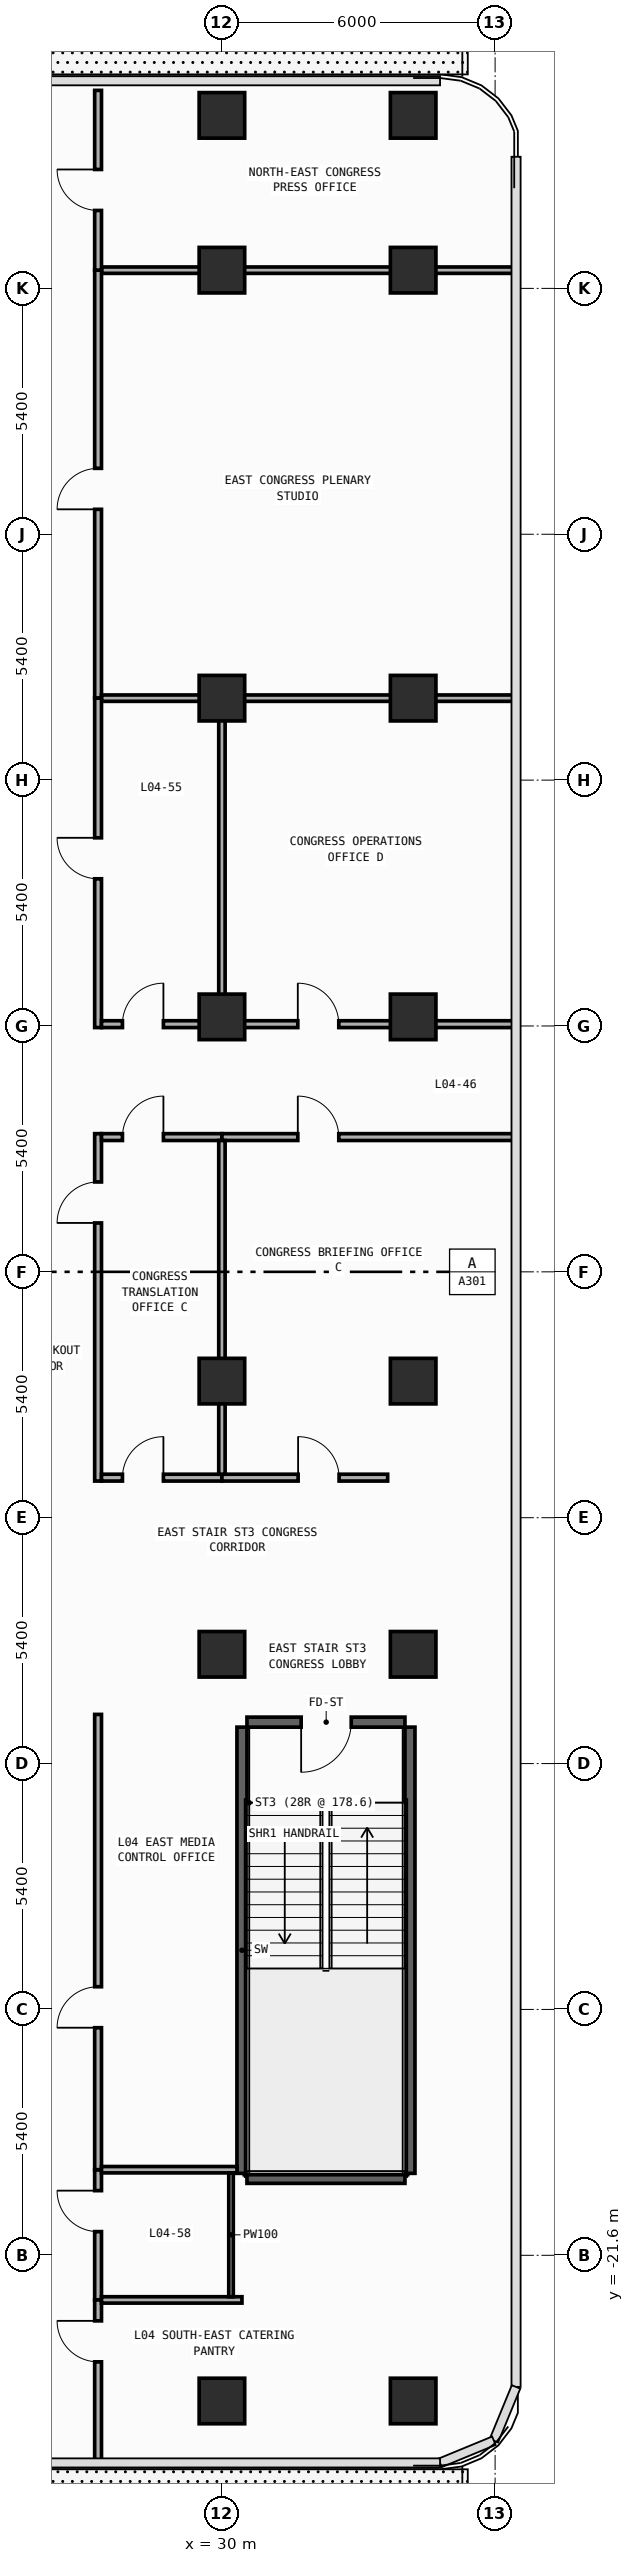
"""IFC4 building model, lengths in metres.
Left out: names, types, materials, properties, quantities, classifications, styles, units other than length and angle.
Written with IfcOpenShell. Run it as: python <this file> out.ifc"""

import sys

from ifc_helpers import new_model, si_unit, direction, frame, frame_2d, origin, origin_2d, place, context, subcontext, project, spatial, rectangle, extrude, element, fill, save


model = new_model("IFC4")
c1 = context("Model", 3, precision=1e-05, world=origin(), true_north=direction((0.0, 1.0)))
c2 = subcontext(c1, "Body", "Model", "MODEL_VIEW")
j1 = project(units=[si_unit("LENGTHUNIT", "METRE"), si_unit("PLANEANGLEUNIT", "RADIAN")], contexts=[c1])
p1 = place(None, origin())
s1 = spatial("IfcSite", under=j1, at=p1, CompositionType="ELEMENT")
p2 = place(p1, origin())
s2 = spatial("IfcBuilding", under=s1, at=p2, CompositionType="ELEMENT")
p3 = place(p2, frame((0.0, 0.0, 16.0)))
s3 = spatial("IfcBuildingStorey", under=s2, at=p3, CompositionType="ELEMENT", Elevation=16.0)
p4 = place(p3, frame((34.02, -9.89, 0.0), z_axis=(0.0, 0.0, 1.0), x_axis=(-1.0, 0.0, 0.0)))
e1 = element("IfcWall", 1, at=p4, inside=s3, PredefinedType="SHEAR", context=c2, shape_type="SweptSolid", body=[
    extrude(rectangle(XDim=3.47, YDim=0.22, at=frame_2d((1.735, 0.0))), origin(), (0.0, 0.0, 1.0), 4.55),
])
p5 = place(p4, frame((1.18, 0.0, 0.0)))
e2 = element("IfcOpeningElement", 2, at=p5, cuts=e1, PredefinedType="OPENING", context=c2, shape_type="SweptSolid", body=[
    extrude(rectangle(XDim=1.1, YDim=2.2, at=frame_2d((0.55, 1.1))), frame((0.0, 0.12, 0.0), z_axis=(0.0, -1.0, 0.0), x_axis=(1.0, 0.0, 0.0)), (0.0, 0.0, 1.0), 0.24),
])
p6 = place(p3, frame((30.55, -19.91, 0.0), z_axis=(0.0, 0.0, 1.0), x_axis=(1.0, 0.0, 0.0)))
e3 = element("IfcWall", 3, at=p6, inside=s3, PredefinedType="SHEAR", context=c2, shape_type="SweptSolid", body=[
    extrude(rectangle(XDim=3.47, YDim=0.22, at=frame_2d((1.735, 0.0))), origin(), (0.0, 0.0, 1.0), 4.55),
])
for number, where, z_axis, x_axis in (
    (4, (30.44, -19.8, 0.0), (0.0, 0.0, 1.0), (0.0, 1.0, 0.0)),
    (5, (34.13, -19.8, 0.0), (0.0, 0.0, 1.0), (0.0, 1.0, 0.0)),
):
    element("IfcWall", number, at=place(p3, frame(where, z_axis=z_axis, x_axis=x_axis)), inside=s3, PredefinedType="SHEAR", context=c2, shape_type="SweptSolid", body=[
        extrude(rectangle(XDim=9.8, YDim=0.22, at=frame_2d((4.9, 0.0))), origin(), (0.0, 0.0, 1.0), 4.55),
    ])
for number, where, z_axis, x_axis in (
    (6, (30.0, -24.8, 0.0), (0.0, 0.0, 1.0), (1.0, 0.0, 0.0)),
    (7, (30.0, -8.4, 0.0), (0.0, 0.0, 1.0), (1.0, 0.0, 0.0)),
    (8, (30.0, -2.4, 0.0), (0.0, 0.0, 1.0), (1.0, 0.0, 0.0)),
    (9, (30.0, 5.6, 0.0), (0.0, 0.0, 1.0), (1.0, 0.0, 0.0)),
    (10, (30.0, 12.6, 0.0), (0.0, 0.0, 1.0), (1.0, 0.0, 0.0)),
    (11, (30.0, 22.0, 0.0), (0.0, 0.0, 1.0), (1.0, 0.0, 0.0)),
    (12, (30.0, 25.4, 0.0), (0.0, 0.0, 1.0), (1.0, 0.0, 0.0)),
    (13, (34.2, -24.8, 0.0), (0.0, 0.0, 1.0), (1.0, 0.0, 0.0)),
    (14, (34.2, -8.4, 0.0), (0.0, 0.0, 1.0), (1.0, 0.0, 0.0)),
    (15, (34.2, -2.4, 0.0), (0.0, 0.0, 1.0), (1.0, 0.0, 0.0)),
    (16, (34.2, 5.6, 0.0), (0.0, 0.0, 1.0), (1.0, 0.0, 0.0)),
    (17, (34.2, 12.6, 0.0), (0.0, 0.0, 1.0), (1.0, 0.0, 0.0)),
    (18, (34.2, 22.0, 0.0), (0.0, 0.0, 1.0), (1.0, 0.0, 0.0)),
    (19, (34.2, 25.4, 0.0), (0.0, 0.0, 1.0), (1.0, 0.0, 0.0)),
):
    element("IfcColumn", number, at=place(p3, frame(where, z_axis=z_axis, x_axis=x_axis)), inside=s3, PredefinedType="COLUMN", context=c2, shape_type="SweptSolid", body=[
        extrude(rectangle(XDim=1.0, YDim=1.0, at=origin_2d()), origin(), (0.0, 0.0, 1.0), 5.0),
    ])
p7 = place(p3, frame((27.355, 22.0, 0.0), z_axis=(0.0, 0.0, 1.0), x_axis=(1.0, 0.0, 0.0)))
e20 = element("IfcWall", 20, at=p7, inside=s3, PredefinedType="PARTITIONING", context=c2, shape_type="SweptSolid", body=[
    extrude(rectangle(XDim=9.09, YDim=0.14, at=frame_2d((4.545, 0.0))), origin(), (0.0, 0.0, 1.0), 3.65),
])
p8 = place(p3, frame((27.28, 12.6, 0.0), z_axis=(0.0, 0.0, 1.0), x_axis=(0.0, 1.0, 0.0)))
e21 = element("IfcWall", 21, at=p8, inside=s3, PredefinedType="PARTITIONING", context=c2, shape_type="SweptSolid", body=[
    extrude(rectangle(XDim=9.4, YDim=0.15, at=frame_2d((4.7, 0.0))), origin(), (0.0, 0.0, 1.0), 4.55),
])
p9 = place(p8, frame((4.148, 0.0, 0.0)))
e22 = element("IfcOpeningElement", 22, at=p9, cuts=e21, PredefinedType="OPENING", context=c2, shape_type="SweptSolid", body=[
    extrude(rectangle(XDim=0.9, YDim=2.15, at=frame_2d((0.45, 1.075))), frame((0.0, 0.085, 0.0), z_axis=(0.0, -1.0, 0.0), x_axis=(1.0, 0.0, 0.0)), (0.0, 0.0, 1.0), 0.17),
])
p10 = place(p3, frame((27.355, 12.6, 0.0), z_axis=(0.0, 0.0, 1.0), x_axis=(1.0, 0.0, 0.0)))
e23 = element("IfcWall", 23, at=p10, inside=s3, PredefinedType="PARTITIONING", context=c2, shape_type="SweptSolid", body=[
    extrude(rectangle(XDim=2.645, YDim=0.14, at=frame_2d((1.323, 0.0))), origin(), (0.0, 0.0, 1.0), 3.65),
])
p11 = place(p3, frame((30.0, 12.6, 0.0), z_axis=(0.0, 0.0, 1.0), x_axis=(1.0, 0.0, 0.0)))
e24 = element("IfcWall", 24, at=p11, inside=s3, PredefinedType="PARTITIONING", context=c2, shape_type="SweptSolid", body=[
    extrude(rectangle(XDim=6.445, YDim=0.14, at=frame_2d((3.223, 0.0))), origin(), (0.0, 0.0, 1.0), 3.65),
])
p12 = place(p3, frame((27.28, 22.0, 0.0), z_axis=(0.0, 0.0, 1.0), x_axis=(0.0, 1.0, 0.0)))
e25 = element("IfcWall", 25, at=p12, inside=s3, PredefinedType="PARTITIONING", context=c2, shape_type="SweptSolid", body=[
    extrude(rectangle(XDim=3.949, YDim=0.15, at=frame_2d((1.975, 0.0))), origin(), (0.0, 0.0, 1.0), 4.55),
])
p13 = place(p12, frame((1.312, 0.0, 0.0)))
e26 = element("IfcOpeningElement", 26, at=p13, cuts=e25, PredefinedType="OPENING", context=c2, shape_type="SweptSolid", body=[
    extrude(rectangle(XDim=0.9, YDim=2.15, at=frame_2d((0.45, 1.075))), frame((0.0, 0.085, 0.0), z_axis=(0.0, -1.0, 0.0), x_axis=(1.0, 0.0, 0.0)), (0.0, 0.0, 1.0), 0.17),
])
p14 = place(p3, frame((27.28, -4.595, 0.0), z_axis=(0.0, 0.0, 1.0), x_axis=(0.0, 1.0, 0.0)))
e27 = element("IfcWall", 27, at=p14, inside=s3, PredefinedType="PARTITIONING", context=c2, shape_type="SweptSolid", body=[
    extrude(rectangle(XDim=7.63, YDim=0.15, at=frame_2d((3.815, 0.0))), origin(), (0.0, 0.0, 1.0), 4.55),
])
p15 = place(p14, frame((5.669, 0.0, 0.0)))
e28 = element("IfcOpeningElement", 28, at=p15, cuts=e27, PredefinedType="OPENING", context=c2, shape_type="SweptSolid", body=[
    extrude(rectangle(XDim=0.9, YDim=2.15, at=frame_2d((0.45, 1.075))), frame((0.0, 0.085, 0.0), z_axis=(0.0, -1.0, 0.0), x_axis=(1.0, 0.0, 0.0)), (0.0, 0.0, 1.0), 0.17),
])
p16 = place(p3, frame((27.28, 5.365, 0.0), z_axis=(0.0, 0.0, 1.0), x_axis=(0.0, 1.0, 0.0)))
e29 = element("IfcWall", 29, at=p16, inside=s3, PredefinedType="PARTITIONING", context=c2, shape_type="SweptSolid", body=[
    extrude(rectangle(XDim=7.235, YDim=0.15, at=frame_2d((3.618, 0.0))), origin(), (0.0, 0.0, 1.0), 4.55),
])
p17 = place(p16, frame((3.268, 0.0, 0.0)))
e30 = element("IfcOpeningElement", 30, at=p17, cuts=e29, PredefinedType="OPENING", context=c2, shape_type="SweptSolid", body=[
    extrude(rectangle(XDim=0.9, YDim=2.15, at=frame_2d((0.45, 1.075))), frame((0.0, 0.085, 0.0), z_axis=(0.0, -1.0, 0.0), x_axis=(1.0, 0.0, 0.0)), (0.0, 0.0, 1.0), 0.17),
])
p18 = place(p3, frame((27.28, -22.58, 0.0), z_axis=(0.0, 0.0, 1.0), x_axis=(0.0, 1.0, 0.0)))
e31 = element("IfcWall", 31, at=p18, inside=s3, PredefinedType="PARTITIONING", context=c2, shape_type="SweptSolid", body=[
    extrude(rectangle(XDim=2.86, YDim=0.15, at=frame_2d((1.43, 0.0))), origin(), (0.0, 0.0, 1.0), 4.55),
])
p19 = place(p18, frame((1.5, 0.0, 0.0)))
e32 = element("IfcOpeningElement", 32, at=p19, cuts=e31, PredefinedType="OPENING", context=c2, shape_type="SweptSolid", body=[
    extrude(rectangle(XDim=0.9, YDim=2.15, at=frame_2d((0.45, 1.075))), frame((0.0, 0.085, 0.0), z_axis=(0.0, -1.0, 0.0), x_axis=(1.0, 0.0, 0.0)), (0.0, 0.0, 1.0), 0.17),
])
p20 = place(p3, frame((27.28, -26.121, 0.0), z_axis=(0.0, 0.0, 1.0), x_axis=(0.0, 1.0, 0.0)))
e33 = element("IfcWall", 33, at=p20, inside=s3, PredefinedType="PARTITIONING", context=c2, shape_type="SweptSolid", body=[
    extrude(rectangle(XDim=3.541, YDim=0.15, at=frame_2d((1.771, 0.0))), origin(), (0.0, 0.0, 1.0), 4.55),
])
p21 = place(p20, frame((2.181, 0.0, 0.0)))
e34 = element("IfcOpeningElement", 34, at=p21, cuts=e33, PredefinedType="OPENING", context=c2, shape_type="SweptSolid", body=[
    extrude(rectangle(XDim=0.9, YDim=2.15, at=frame_2d((0.45, 1.075))), frame((0.0, 0.085, 0.0), z_axis=(0.0, -1.0, 0.0), x_axis=(1.0, 0.0, 0.0)), (0.0, 0.0, 1.0), 0.17),
])
p22 = place(p3, frame((27.28, -19.72, 0.0), z_axis=(0.0, 0.0, 1.0), x_axis=(0.0, 1.0, 0.0)))
e35 = element("IfcWall", 35, at=p22, inside=s3, PredefinedType="PARTITIONING", context=c2, shape_type="SweptSolid", body=[
    extrude(rectangle(XDim=10.0, YDim=0.15, at=frame_2d((5.0, 0.0))), origin(), (0.0, 0.0, 1.0), 4.55),
])
p23 = place(p22, frame((3.118, 0.0, 0.0)))
e36 = element("IfcOpeningElement", 36, at=p23, cuts=e35, PredefinedType="OPENING", context=c2, shape_type="SweptSolid", body=[
    extrude(rectangle(XDim=0.9, YDim=2.15, at=frame_2d((0.45, 1.075))), frame((0.0, 0.085, 0.0), z_axis=(0.0, -1.0, 0.0), x_axis=(1.0, 0.0, 0.0)), (0.0, 0.0, 1.0), 0.17),
])
p24 = place(p3, frame((27.355, 2.96, 0.0), z_axis=(0.0, 0.0, 1.0), x_axis=(1.0, 0.0, 0.0)))
e37 = element("IfcWall", 37, at=p24, inside=s3, PredefinedType="PARTITIONING", context=c2, shape_type="SweptSolid", body=[
    extrude(rectangle(XDim=2.645, YDim=0.15, at=frame_2d((1.323, 0.0))), origin(), (0.0, 0.0, 1.0), 4.55),
])
p25 = place(p24, frame((0.46, 0.0, 0.0)))
e38 = element("IfcOpeningElement", 38, at=p25, cuts=e37, PredefinedType="OPENING", context=c2, shape_type="SweptSolid", body=[
    extrude(rectangle(XDim=0.9, YDim=2.15, at=frame_2d((0.45, 1.075))), frame((0.0, 0.085, 0.0), z_axis=(0.0, -1.0, 0.0), x_axis=(1.0, 0.0, 0.0)), (0.0, 0.0, 1.0), 0.17),
])
p26 = place(p3, frame((30.0, 2.96, 0.0), z_axis=(0.0, 0.0, 1.0), x_axis=(1.0, 0.0, 0.0)))
e39 = element("IfcWall", 39, at=p26, inside=s3, PredefinedType="PARTITIONING", context=c2, shape_type="SweptSolid", body=[
    extrude(rectangle(XDim=6.445, YDim=0.15, at=frame_2d((3.223, 0.0))), origin(), (0.0, 0.0, 1.0), 4.55),
])
p27 = place(p26, frame((1.667, 0.0, 0.0)))
e40 = element("IfcOpeningElement", 40, at=p27, cuts=e39, PredefinedType="OPENING", context=c2, shape_type="SweptSolid", body=[
    extrude(rectangle(XDim=0.9, YDim=2.15, at=frame_2d((0.45, 1.075))), frame((0.0, 0.085, 0.0), z_axis=(0.0, -1.0, 0.0), x_axis=(1.0, 0.0, 0.0)), (0.0, 0.0, 1.0), 0.17),
])
p28 = place(p3, frame((27.355, 5.44, 0.0), z_axis=(0.0, 0.0, 1.0), x_axis=(1.0, 0.0, 0.0)))
e41 = element("IfcWall", 41, at=p28, inside=s3, PredefinedType="PARTITIONING", context=c2, shape_type="SweptSolid", body=[
    extrude(rectangle(XDim=2.645, YDim=0.15, at=frame_2d((1.323, 0.0))), origin(), (0.0, 0.0, 1.0), 3.65),
])
p29 = place(p28, frame((0.46, 0.0, 0.0)))
e42 = element("IfcOpeningElement", 42, at=p29, cuts=e41, PredefinedType="OPENING", context=c2, shape_type="SweptSolid", body=[
    extrude(rectangle(XDim=0.9, YDim=2.15, at=frame_2d((0.45, 1.075))), frame((0.0, 0.085, 0.0), z_axis=(0.0, -1.0, 0.0), x_axis=(1.0, 0.0, 0.0)), (0.0, 0.0, 1.0), 0.17),
])
p30 = place(p3, frame((30.0, 5.44, 0.0), z_axis=(0.0, 0.0, 1.0), x_axis=(1.0, 0.0, 0.0)))
e43 = element("IfcWall", 43, at=p30, inside=s3, PredefinedType="PARTITIONING", context=c2, shape_type="SweptSolid", body=[
    extrude(rectangle(XDim=6.445, YDim=0.15, at=frame_2d((3.223, 0.0))), origin(), (0.0, 0.0, 1.0), 3.65),
])
p31 = place(p30, frame((1.667, 0.0, 0.0)))
e44 = element("IfcOpeningElement", 44, at=p31, cuts=e43, PredefinedType="OPENING", context=c2, shape_type="SweptSolid", body=[
    extrude(rectangle(XDim=0.9, YDim=2.15, at=frame_2d((0.45, 1.075))), frame((0.0, 0.085, 0.0), z_axis=(0.0, -1.0, 0.0), x_axis=(1.0, 0.0, 0.0)), (0.0, 0.0, 1.0), 0.17),
])
p32 = place(p3, frame((27.355, -4.52, 0.0), z_axis=(0.0, 0.0, 1.0), x_axis=(1.0, 0.0, 0.0)))
e45 = element("IfcWall", 45, at=p32, inside=s3, PredefinedType="PARTITIONING", context=c2, shape_type="SweptSolid", body=[
    extrude(rectangle(XDim=2.645, YDim=0.15, at=frame_2d((1.323, 0.0))), origin(), (0.0, 0.0, 1.0), 4.55),
])
p33 = place(p32, frame((0.46, 0.0, 0.0)))
e46 = element("IfcOpeningElement", 46, at=p33, cuts=e45, PredefinedType="OPENING", context=c2, shape_type="SweptSolid", body=[
    extrude(rectangle(XDim=0.9, YDim=2.15, at=frame_2d((0.45, 1.075))), frame((0.0, 0.085, 0.0), z_axis=(0.0, -1.0, 0.0), x_axis=(1.0, 0.0, 0.0)), (0.0, 0.0, 1.0), 0.17),
])
p34 = place(p3, frame((30.0, -4.52, 0.0), z_axis=(0.0, 0.0, 1.0), x_axis=(1.0, 0.0, 0.0)))
e47 = element("IfcWall", 47, at=p34, inside=s3, PredefinedType="PARTITIONING", context=c2, shape_type="SweptSolid", body=[
    extrude(rectangle(XDim=3.64, YDim=0.15, at=frame_2d((1.82, 0.0))), origin(), (0.0, 0.0, 1.0), 4.55),
])
p35 = place(p34, frame((1.673, 0.0, 0.0)))
e48 = element("IfcOpeningElement", 48, at=p35, cuts=e47, PredefinedType="OPENING", context=c2, shape_type="SweptSolid", body=[
    extrude(rectangle(XDim=0.9, YDim=2.15, at=frame_2d((0.45, 1.075))), frame((0.0, 0.085, 0.0), z_axis=(0.0, -1.0, 0.0), x_axis=(1.0, 0.0, 0.0)), (0.0, 0.0, 1.0), 0.17),
])
p36 = place(p3, frame((30.0, -4.445, 0.0), z_axis=(0.0, 0.0, 1.0), x_axis=(0.0, 1.0, 0.0)))
e49 = element("IfcWall", 49, at=p36, inside=s3, PredefinedType="PARTITIONING", context=c2, shape_type="SweptSolid", body=[
    extrude(rectangle(XDim=7.33, YDim=0.14, at=frame_2d((3.665, 0.0))), origin(), (0.0, 0.0, 1.0), 3.65),
])
p37 = place(p3, frame((30.0, 5.515, 0.0), z_axis=(0.0, 0.0, 1.0), x_axis=(0.0, 1.0, 0.0)))
e50 = element("IfcWall", 50, at=p37, inside=s3, PredefinedType="PARTITIONING", context=c2, shape_type="SweptSolid", body=[
    extrude(rectangle(XDim=7.015, YDim=0.14, at=frame_2d((3.508, 0.0))), origin(), (0.0, 0.0, 1.0), 3.65),
])
p38 = place(p3, frame((27.355, -22.58, 0.0), z_axis=(0.0, 0.0, 1.0), x_axis=(1.0, 0.0, 0.0)))
e51 = element("IfcWall", 51, at=p38, inside=s3, PredefinedType="PARTITIONING", context=c2, shape_type="SweptSolid", body=[
    extrude(rectangle(XDim=3.085, YDim=0.14, at=frame_2d((1.542, 0.0))), origin(), (0.0, 0.0, 1.0), 4.55),
])
p39 = place(p3, frame((27.355, -19.72, 0.0), z_axis=(0.0, 0.0, 1.0), x_axis=(1.0, 0.0, 0.0)))
e52 = element("IfcWall", 52, at=p39, inside=s3, PredefinedType="PARTITIONING", context=c2, shape_type="SweptSolid", body=[
    extrude(rectangle(XDim=2.975, YDim=0.14, at=frame_2d((1.488, 0.0))), origin(), (0.0, 0.0, 1.0), 4.55),
])
p40 = place(p3, frame((30.2, -19.79, 0.0), z_axis=(0.0, 0.0, 1.0), x_axis=(0.0, -1.0, 0.0)))
e53 = element("IfcWall", 53, at=p40, inside=s3, PredefinedType="PARTITIONING", context=c2, shape_type="SweptSolid", body=[
    extrude(rectangle(XDim=2.72, YDim=0.1, at=frame_2d((1.36, 0.0))), origin(), (0.0, 0.0, 1.0), 4.55),
])
p41 = place(p5, origin())
e54 = element("IfcDoor", 54, at=p41, inside=s3, OperationType="SINGLE_SWING_RIGHT", PredefinedType="DOOR", context=c2, shape_type="SweptSolid", body=[
    extrude(rectangle(XDim=1.1, YDim=2.2, at=frame_2d((0.55, 1.1))), frame((0.0, 0.025, 0.0), z_axis=(0.0, -1.0, 0.0), x_axis=(1.0, 0.0, 0.0)), (0.0, 0.0, 1.0), 0.05),
])
fill(e2, e54)
p42 = place(p9, origin())
e55 = element("IfcDoor", 55, at=p42, inside=s3, OperationType="SINGLE_SWING_LEFT", PredefinedType="DOOR", context=c2, shape_type="SweptSolid", body=[
    extrude(rectangle(XDim=0.9, YDim=2.15, at=frame_2d((0.45, 1.075))), frame((0.0, 0.025, 0.0), z_axis=(0.0, -1.0, 0.0), x_axis=(1.0, 0.0, 0.0)), (0.0, 0.0, 1.0), 0.05),
])
fill(e22, e55)
p43 = place(p13, origin())
e56 = element("IfcDoor", 56, at=p43, inside=s3, OperationType="SINGLE_SWING_RIGHT", PredefinedType="DOOR", context=c2, shape_type="SweptSolid", body=[
    extrude(rectangle(XDim=0.9, YDim=2.15, at=frame_2d((0.45, 1.075))), frame((0.0, 0.025, 0.0), z_axis=(0.0, -1.0, 0.0), x_axis=(1.0, 0.0, 0.0)), (0.0, 0.0, 1.0), 0.05),
])
fill(e26, e56)
p44 = place(p15, origin())
e57 = element("IfcDoor", 57, at=p44, inside=s3, OperationType="SINGLE_SWING_LEFT", PredefinedType="DOOR", context=c2, shape_type="SweptSolid", body=[
    extrude(rectangle(XDim=0.9, YDim=2.15, at=frame_2d((0.45, 1.075))), frame((0.0, 0.025, 0.0), z_axis=(0.0, -1.0, 0.0), x_axis=(1.0, 0.0, 0.0)), (0.0, 0.0, 1.0), 0.05),
])
fill(e28, e57)
p45 = place(p17, origin())
e58 = element("IfcDoor", 58, at=p45, inside=s3, OperationType="SINGLE_SWING_RIGHT", PredefinedType="DOOR", context=c2, shape_type="SweptSolid", body=[
    extrude(rectangle(XDim=0.9, YDim=2.15, at=frame_2d((0.45, 1.075))), frame((0.0, 0.025, 0.0), z_axis=(0.0, -1.0, 0.0), x_axis=(1.0, 0.0, 0.0)), (0.0, 0.0, 1.0), 0.05),
])
fill(e30, e58)
p46 = place(p19, origin())
e59 = element("IfcDoor", 59, at=p46, inside=s3, OperationType="SINGLE_SWING_RIGHT", PredefinedType="DOOR", context=c2, shape_type="SweptSolid", body=[
    extrude(rectangle(XDim=0.9, YDim=2.15, at=frame_2d((0.45, 1.075))), frame((0.0, 0.025, 0.0), z_axis=(0.0, -1.0, 0.0), x_axis=(1.0, 0.0, 0.0)), (0.0, 0.0, 1.0), 0.05),
])
fill(e32, e59)
p47 = place(p21, origin())
e60 = element("IfcDoor", 60, at=p47, inside=s3, OperationType="SINGLE_SWING_RIGHT", PredefinedType="DOOR", context=c2, shape_type="SweptSolid", body=[
    extrude(rectangle(XDim=0.9, YDim=2.15, at=frame_2d((0.45, 1.075))), frame((0.0, 0.025, 0.0), z_axis=(0.0, -1.0, 0.0), x_axis=(1.0, 0.0, 0.0)), (0.0, 0.0, 1.0), 0.05),
])
fill(e34, e60)
p48 = place(p23, origin())
e61 = element("IfcDoor", 61, at=p48, inside=s3, OperationType="SINGLE_SWING_LEFT", PredefinedType="DOOR", context=c2, shape_type="SweptSolid", body=[
    extrude(rectangle(XDim=0.9, YDim=2.15, at=frame_2d((0.45, 1.075))), frame((0.0, 0.025, 0.0), z_axis=(0.0, -1.0, 0.0), x_axis=(1.0, 0.0, 0.0)), (0.0, 0.0, 1.0), 0.05),
])
fill(e36, e61)
p49 = place(p25, origin())
e62 = element("IfcDoor", 62, at=p49, inside=s3, OperationType="SINGLE_SWING_RIGHT", PredefinedType="DOOR", context=c2, shape_type="SweptSolid", body=[
    extrude(rectangle(XDim=0.9, YDim=2.15, at=frame_2d((0.45, 1.075))), frame((0.0, 0.025, 0.0), z_axis=(0.0, -1.0, 0.0), x_axis=(1.0, 0.0, 0.0)), (0.0, 0.0, 1.0), 0.05),
])
fill(e38, e62)
p50 = place(p27, origin())
e63 = element("IfcDoor", 63, at=p50, inside=s3, OperationType="SINGLE_SWING_LEFT", PredefinedType="DOOR", context=c2, shape_type="SweptSolid", body=[
    extrude(rectangle(XDim=0.9, YDim=2.15, at=frame_2d((0.45, 1.075))), frame((0.0, 0.025, 0.0), z_axis=(0.0, -1.0, 0.0), x_axis=(1.0, 0.0, 0.0)), (0.0, 0.0, 1.0), 0.05),
])
fill(e40, e63)
p51 = place(p29, origin())
e64 = element("IfcDoor", 64, at=p51, inside=s3, OperationType="SINGLE_SWING_RIGHT", PredefinedType="DOOR", context=c2, shape_type="SweptSolid", body=[
    extrude(rectangle(XDim=0.9, YDim=2.15, at=frame_2d((0.45, 1.075))), frame((0.0, 0.025, 0.0), z_axis=(0.0, -1.0, 0.0), x_axis=(1.0, 0.0, 0.0)), (0.0, 0.0, 1.0), 0.05),
])
fill(e42, e64)
p52 = place(p31, origin())
e65 = element("IfcDoor", 65, at=p52, inside=s3, OperationType="SINGLE_SWING_LEFT", PredefinedType="DOOR", context=c2, shape_type="SweptSolid", body=[
    extrude(rectangle(XDim=0.9, YDim=2.15, at=frame_2d((0.45, 1.075))), frame((0.0, 0.025, 0.0), z_axis=(0.0, -1.0, 0.0), x_axis=(1.0, 0.0, 0.0)), (0.0, 0.0, 1.0), 0.05),
])
fill(e44, e65)
p53 = place(p33, origin())
e66 = element("IfcDoor", 66, at=p53, inside=s3, OperationType="SINGLE_SWING_RIGHT", PredefinedType="DOOR", context=c2, shape_type="SweptSolid", body=[
    extrude(rectangle(XDim=0.9, YDim=2.15, at=frame_2d((0.45, 1.075))), frame((0.0, 0.025, 0.0), z_axis=(0.0, -1.0, 0.0), x_axis=(1.0, 0.0, 0.0)), (0.0, 0.0, 1.0), 0.05),
])
fill(e46, e66)
p54 = place(p35, origin())
e67 = element("IfcDoor", 67, at=p54, inside=s3, OperationType="SINGLE_SWING_LEFT", PredefinedType="DOOR", context=c2, shape_type="SweptSolid", body=[
    extrude(rectangle(XDim=0.9, YDim=2.15, at=frame_2d((0.45, 1.075))), frame((0.0, 0.025, 0.0), z_axis=(0.0, -1.0, 0.0), x_axis=(1.0, 0.0, 0.0)), (0.0, 0.0, 1.0), 0.05),
])
fill(e48, e67)
save(model, sys.argv[1])
